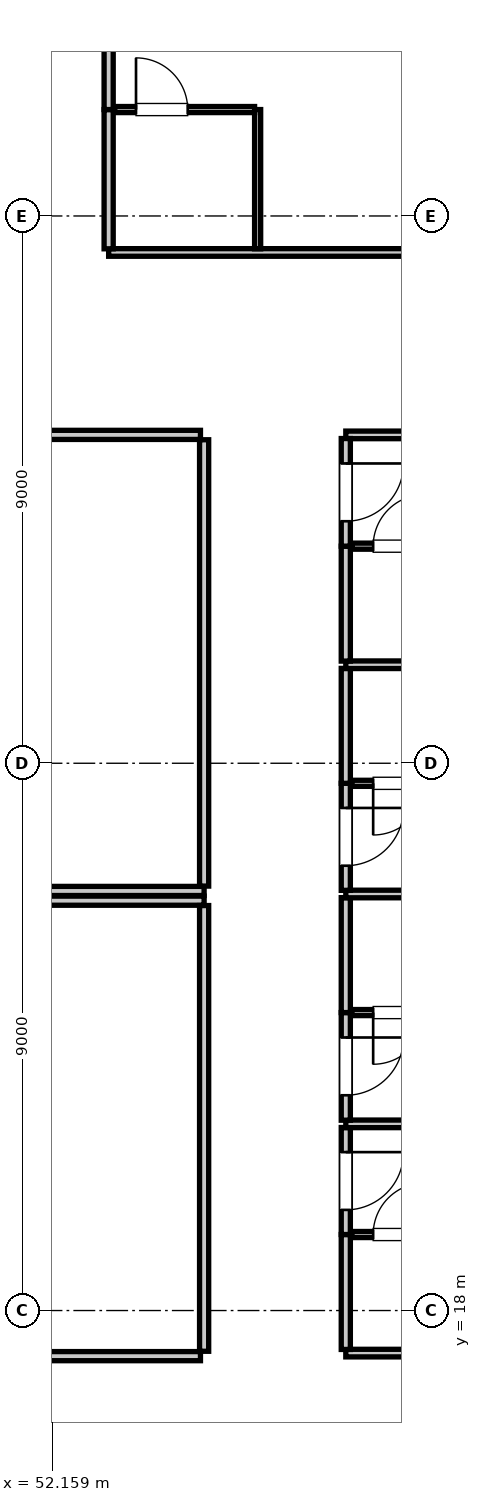
"""IFC4 building model, lengths in metres.
Left out: names, types, materials, properties, quantities, classifications, styles, units other than length and angle.
Written with IfcOpenShell. Run it as: python <this file> out.ifc"""

import sys

from ifc_helpers import new_model, si_unit, direction, frame, frame_2d, origin, place, context, subcontext, project, spatial, rectangle, extrude, element, fill, save


model = new_model("IFC4")
c1 = context("Model", 3, precision=1e-05, world=origin(), true_north=direction((0.0, 1.0)))
c2 = subcontext(c1, "Body", "Model", "MODEL_VIEW")
j1 = project(units=[si_unit("LENGTHUNIT", "METRE"), si_unit("PLANEANGLEUNIT", "RADIAN")], contexts=[c1])
p1 = place(None, origin())
s1 = spatial("IfcSite", under=j1, at=p1, CompositionType="ELEMENT")
p2 = place(p1, origin())
s2 = spatial("IfcBuilding", under=s1, at=p2, CompositionType="ELEMENT")
p3 = place(p2, frame((0.0, 0.0, 100.1)))
s3 = spatial("IfcBuildingStorey", under=s2, at=p3, CompositionType="ELEMENT", Elevation=100.1)
p4 = place(p3, frame((20.95, 24.9, 0.0), z_axis=(0.0, 0.0, 1.0), x_axis=(1.0, 0.0, 0.0)))
e1 = element("IfcWall", 1, at=p4, inside=s3, PredefinedType="PARTITIONING", context=c2, shape_type="SweptSolid", body=[
    extrude(rectangle(XDim=33.7, YDim=0.15, at=frame_2d((16.85, 0.0))), origin(), (0.0, 0.0, 1.0), 3.61),
])
p5 = place(p3, frame((54.65, 24.98, 0.0), z_axis=(0.0, 0.0, 1.0), x_axis=(0.0, 1.0, 0.0)))
e2 = element("IfcWall", 2, at=p5, inside=s3, PredefinedType="PARTITIONING", context=c2, shape_type="SweptSolid", body=[
    extrude(rectangle(XDim=7.34, YDim=0.15, at=frame_2d((3.67, 0.0))), origin(), (0.0, 0.0, 1.0), 3.293),
])
p6 = place(p3, frame((43.222, 32.4, 0.0), z_axis=(0.0, 0.0, 1.0), x_axis=(1.0, 0.0, 0.0)))
e3 = element("IfcWall", 3, at=p6, inside=s3, PredefinedType="PARTITIONING", context=c2, shape_type="SweptSolid", body=[
    extrude(rectangle(XDim=11.368, YDim=0.15, at=frame_2d((5.684, 0.0))), origin(), (0.0, 0.0, 1.0), 3.61),
])
p7 = place(p6, frame((5.234, 0.0, 0.0)))
e4 = element("IfcOpeningElement", 4, at=p7, cuts=e3, PredefinedType="OPENING", context=c2, shape_type="SweptSolid", body=[
    extrude(rectangle(XDim=0.9, YDim=2.1, at=frame_2d((0.45, 1.05))), frame((0.0, 0.085, 0.0), z_axis=(0.0, -1.0, 0.0), x_axis=(1.0, 0.0, 0.0)), (0.0, 0.0, 1.0), 0.17),
])
p8 = place(p3, frame((20.95, 24.74, 0.0), z_axis=(0.0, 0.0, 1.0), x_axis=(1.0, 0.0, 0.0)))
e5 = element("IfcWall", 5, at=p8, inside=s3, PredefinedType="PARTITIONING", context=c2, shape_type="SweptSolid", body=[
    extrude(rectangle(XDim=33.7, YDim=0.15, at=frame_2d((16.85, 0.0))), origin(), (0.0, 0.0, 1.0), 3.61),
])
p9 = place(p3, frame((54.65, 17.33, 0.0), z_axis=(0.0, 0.0, 1.0), x_axis=(0.0, 1.0, 0.0)))
e6 = element("IfcWall", 6, at=p9, inside=s3, PredefinedType="PARTITIONING", context=c2, shape_type="SweptSolid", body=[
    extrude(rectangle(XDim=7.33, YDim=0.15, at=frame_2d((3.665, 0.0))), origin(), (0.0, 0.0, 1.0), 3.255),
])
p10 = place(p3, frame((33.449, 17.25, 0.0), z_axis=(0.0, 0.0, 1.0), x_axis=(1.0, 0.0, 0.0)))
e7 = element("IfcWall", 7, at=p10, inside=s3, PredefinedType="PARTITIONING", context=c2, shape_type="SweptSolid", body=[
    extrude(rectangle(XDim=21.141, YDim=0.15, at=frame_2d((10.571, 0.0))), origin(), (0.0, 0.0, 1.0), 3.61),
])
p11 = place(p10, frame((10.121, 0.0, 0.0)))
e8 = element("IfcOpeningElement", 8, at=p11, cuts=e7, PredefinedType="OPENING", context=c2, shape_type="SweptSolid", body=[
    extrude(rectangle(XDim=0.9, YDim=2.1, at=frame_2d((0.45, 1.05))), frame((0.0, 0.085, 0.0), z_axis=(0.0, -1.0, 0.0), x_axis=(1.0, 0.0, 0.0)), (0.0, 0.0, 1.0), 0.17),
])
for number, where, z_axis, x_axis in (
    (9, (56.98, 17.3, 0.0), (0.0, 0.0, 1.0), (1.0, 0.0, 0.0)),
    (10, (56.98, 32.4, 0.0), (0.0, 0.0, 1.0), (1.0, 0.0, 0.0)),
):
    element("IfcWall", number, at=place(p3, frame(where, z_axis=z_axis, x_axis=x_axis)), inside=s3, PredefinedType="PARTITIONING", context=c2, shape_type="SweptSolid", body=[
        extrude(rectangle(XDim=7.72, YDim=0.125, at=frame_2d((3.86, 0.0))), origin(), (0.0, 0.0, 1.0), 3.61),
    ])
p12 = place(p3, frame((56.98, 17.36, 0.0), z_axis=(0.0, 0.0, 1.0), x_axis=(0.0, 1.0, 0.0)))
e11 = element("IfcWall", 11, at=p12, inside=s3, PredefinedType="PARTITIONING", context=c2, shape_type="SweptSolid", body=[
    extrude(rectangle(XDim=1.89, YDim=0.15, at=frame_2d((0.945, 0.0))), origin(), (0.0, 0.0, 1.0), 3.61),
])
p13 = place(p3, frame((56.98, 19.25, 0.0), z_axis=(0.0, 0.0, 1.0), x_axis=(0.0, 1.0, 0.0)))
e12 = element("IfcWall", 12, at=p13, inside=s3, PredefinedType="PARTITIONING", context=c2, shape_type="SweptSolid", body=[
    extrude(rectangle(XDim=1.76, YDim=0.15, at=frame_2d((0.88, 0.0))), origin(), (0.0, 0.0, 1.0), 3.61),
])
p14 = place(p13, frame((0.405, 0.0, 0.0)))
e13 = element("IfcOpeningElement", 13, at=p14, cuts=e12, PredefinedType="OPENING", context=c2, shape_type="SweptSolid", body=[
    extrude(rectangle(XDim=0.95, YDim=2.15, at=frame_2d((0.475, 1.075))), frame((0.0, 0.085, 0.0), z_axis=(0.0, -1.0, 0.0), x_axis=(1.0, 0.0, 0.0)), (0.0, 0.0, 1.0), 0.17),
])
p15 = place(p3, frame((57.08, 19.25, 0.0), z_axis=(0.0, 0.0, 1.0), x_axis=(1.0, 0.0, 0.0)))
e14 = element("IfcWall", 14, at=p15, inside=s3, PredefinedType="PARTITIONING", context=c2, shape_type="SweptSolid", body=[
    extrude(rectangle(XDim=2.3, YDim=0.1, at=frame_2d((1.15, 0.0))), origin(), (0.0, 0.0, 1.0), 3.61),
])
p16 = place(p15, frame((0.35, 0.0, 0.0)))
e15 = element("IfcOpeningElement", 15, at=p16, cuts=e14, PredefinedType="OPENING", context=c2, shape_type="SweptSolid", body=[
    extrude(rectangle(XDim=0.85, YDim=2.1, at=frame_2d((0.425, 1.05))), frame((0.0, 0.06, 0.0), z_axis=(0.0, -1.0, 0.0), x_axis=(1.0, 0.0, 0.0)), (0.0, 0.0, 1.0), 0.12),
])
p17 = place(p3, frame((56.98, 21.07, 0.0), z_axis=(0.0, 0.0, 1.0), x_axis=(1.0, 0.0, 0.0)))
e16 = element("IfcWall", 16, at=p17, inside=s3, PredefinedType="PARTITIONING", context=c2, shape_type="SweptSolid", body=[
    extrude(rectangle(XDim=7.72, YDim=0.125, at=frame_2d((3.86, 0.0))), origin(), (0.0, 0.0, 1.0), 3.61),
])
p18 = place(p3, frame((56.98, 21.13, 0.0), z_axis=(0.0, 0.0, 1.0), x_axis=(0.0, 1.0, 0.0)))
e17 = element("IfcWall", 17, at=p18, inside=s3, PredefinedType="PARTITIONING", context=c2, shape_type="SweptSolid", body=[
    extrude(rectangle(XDim=1.77, YDim=0.15, at=frame_2d((0.885, 0.0))), origin(), (0.0, 0.0, 1.0), 3.61),
])
p19 = place(p18, frame((0.41, 0.0, 0.0)))
e18 = element("IfcOpeningElement", 18, at=p19, cuts=e17, PredefinedType="OPENING", context=c2, shape_type="SweptSolid", body=[
    extrude(rectangle(XDim=0.95, YDim=2.15, at=frame_2d((0.475, 1.075))), frame((0.0, 0.085, 0.0), z_axis=(0.0, -1.0, 0.0), x_axis=(1.0, 0.0, 0.0)), (0.0, 0.0, 1.0), 0.17),
])
p20 = place(p3, frame((56.98, 22.9, 0.0), z_axis=(0.0, 0.0, 1.0), x_axis=(0.0, 1.0, 0.0)))
e19 = element("IfcWall", 19, at=p20, inside=s3, PredefinedType="PARTITIONING", context=c2, shape_type="SweptSolid", body=[
    extrude(rectangle(XDim=1.89, YDim=0.15, at=frame_2d((0.945, 0.0))), origin(), (0.0, 0.0, 1.0), 3.61),
])
p21 = place(p3, frame((57.08, 22.9, 0.0), z_axis=(0.0, 0.0, 1.0), x_axis=(1.0, 0.0, 0.0)))
e20 = element("IfcWall", 20, at=p21, inside=s3, PredefinedType="PARTITIONING", context=c2, shape_type="SweptSolid", body=[
    extrude(rectangle(XDim=2.3, YDim=0.1, at=frame_2d((1.15, 0.0))), origin(), (0.0, 0.0, 1.0), 3.61),
])
p22 = place(p21, frame((0.35, 0.0, 0.0)))
e21 = element("IfcOpeningElement", 21, at=p22, cuts=e20, PredefinedType="OPENING", context=c2, shape_type="SweptSolid", body=[
    extrude(rectangle(XDim=0.85, YDim=2.1, at=frame_2d((0.425, 1.05))), frame((0.0, 0.06, 0.0), z_axis=(0.0, -1.0, 0.0), x_axis=(1.0, 0.0, 0.0)), (0.0, 0.0, 1.0), 0.12),
])
p23 = place(p3, frame((56.98, 24.85, 0.0), z_axis=(0.0, 0.0, 1.0), x_axis=(1.0, 0.0, 0.0)))
e22 = element("IfcWall", 22, at=p23, inside=s3, PredefinedType="PARTITIONING", context=c2, shape_type="SweptSolid", body=[
    extrude(rectangle(XDim=7.72, YDim=0.125, at=frame_2d((3.86, 0.0))), origin(), (0.0, 0.0, 1.0), 3.61),
])
p24 = place(p3, frame((56.98, 24.91, 0.0), z_axis=(0.0, 0.0, 1.0), x_axis=(0.0, 1.0, 0.0)))
e23 = element("IfcWall", 23, at=p24, inside=s3, PredefinedType="PARTITIONING", context=c2, shape_type="SweptSolid", body=[
    extrude(rectangle(XDim=1.76, YDim=0.15, at=frame_2d((0.88, 0.0))), origin(), (0.0, 0.0, 1.0), 3.61),
])
p25 = place(p24, frame((0.405, 0.0, 0.0)))
e24 = element("IfcOpeningElement", 24, at=p25, cuts=e23, PredefinedType="OPENING", context=c2, shape_type="SweptSolid", body=[
    extrude(rectangle(XDim=0.95, YDim=2.15, at=frame_2d((0.475, 1.075))), frame((0.0, 0.085, 0.0), z_axis=(0.0, -1.0, 0.0), x_axis=(1.0, 0.0, 0.0)), (0.0, 0.0, 1.0), 0.17),
])
p26 = place(p3, frame((56.98, 26.67, 0.0), z_axis=(0.0, 0.0, 1.0), x_axis=(0.0, 1.0, 0.0)))
e25 = element("IfcWall", 25, at=p26, inside=s3, PredefinedType="PARTITIONING", context=c2, shape_type="SweptSolid", body=[
    extrude(rectangle(XDim=1.89, YDim=0.15, at=frame_2d((0.945, 0.0))), origin(), (0.0, 0.0, 1.0), 3.61),
])
p27 = place(p3, frame((57.08, 26.67, 0.0), z_axis=(0.0, 0.0, 1.0), x_axis=(1.0, 0.0, 0.0)))
e26 = element("IfcWall", 26, at=p27, inside=s3, PredefinedType="PARTITIONING", context=c2, shape_type="SweptSolid", body=[
    extrude(rectangle(XDim=2.3, YDim=0.1, at=frame_2d((1.15, 0.0))), origin(), (0.0, 0.0, 1.0), 3.61),
])
p28 = place(p27, frame((0.35, 0.0, 0.0)))
e27 = element("IfcOpeningElement", 27, at=p28, cuts=e26, PredefinedType="OPENING", context=c2, shape_type="SweptSolid", body=[
    extrude(rectangle(XDim=0.85, YDim=2.1, at=frame_2d((0.425, 1.05))), frame((0.0, 0.06, 0.0), z_axis=(0.0, -1.0, 0.0), x_axis=(1.0, 0.0, 0.0)), (0.0, 0.0, 1.0), 0.12),
])
p29 = place(p3, frame((56.98, 28.62, 0.0), z_axis=(0.0, 0.0, 1.0), x_axis=(1.0, 0.0, 0.0)))
e28 = element("IfcWall", 28, at=p29, inside=s3, PredefinedType="PARTITIONING", context=c2, shape_type="SweptSolid", body=[
    extrude(rectangle(XDim=7.72, YDim=0.125, at=frame_2d((3.86, 0.0))), origin(), (0.0, 0.0, 1.0), 3.61),
])
p30 = place(p3, frame((56.98, 28.68, 0.0), z_axis=(0.0, 0.0, 1.0), x_axis=(0.0, 1.0, 0.0)))
e29 = element("IfcWall", 29, at=p30, inside=s3, PredefinedType="PARTITIONING", context=c2, shape_type="SweptSolid", body=[
    extrude(rectangle(XDim=1.89, YDim=0.15, at=frame_2d((0.945, 0.0))), origin(), (0.0, 0.0, 1.0), 3.61),
])
p31 = place(p3, frame((56.98, 30.57, 0.0), z_axis=(0.0, 0.0, 1.0), x_axis=(0.0, 1.0, 0.0)))
e30 = element("IfcWall", 30, at=p31, inside=s3, PredefinedType="PARTITIONING", context=c2, shape_type="SweptSolid", body=[
    extrude(rectangle(XDim=1.77, YDim=0.15, at=frame_2d((0.885, 0.0))), origin(), (0.0, 0.0, 1.0), 3.61),
])
p32 = place(p31, frame((0.41, 0.0, 0.0)))
e31 = element("IfcOpeningElement", 31, at=p32, cuts=e30, PredefinedType="OPENING", context=c2, shape_type="SweptSolid", body=[
    extrude(rectangle(XDim=0.95, YDim=2.15, at=frame_2d((0.475, 1.075))), frame((0.0, 0.085, 0.0), z_axis=(0.0, -1.0, 0.0), x_axis=(1.0, 0.0, 0.0)), (0.0, 0.0, 1.0), 0.17),
])
p33 = place(p3, frame((57.08, 30.57, 0.0), z_axis=(0.0, 0.0, 1.0), x_axis=(1.0, 0.0, 0.0)))
e32 = element("IfcWall", 32, at=p33, inside=s3, PredefinedType="PARTITIONING", context=c2, shape_type="SweptSolid", body=[
    extrude(rectangle(XDim=2.3, YDim=0.1, at=frame_2d((1.15, 0.0))), origin(), (0.0, 0.0, 1.0), 3.61),
])
p34 = place(p33, frame((0.35, 0.0, 0.0)))
e33 = element("IfcOpeningElement", 33, at=p34, cuts=e32, PredefinedType="OPENING", context=c2, shape_type="SweptSolid", body=[
    extrude(rectangle(XDim=0.85, YDim=2.1, at=frame_2d((0.425, 1.05))), frame((0.0, 0.06, 0.0), z_axis=(0.0, -1.0, 0.0), x_axis=(1.0, 0.0, 0.0)), (0.0, 0.0, 1.0), 0.12),
])
p35 = place(p3, frame((53.08, 35.4, 0.0), z_axis=(0.0, 0.0, 1.0), x_axis=(1.0, 0.0, 0.0)))
e34 = element("IfcWall", 34, at=p35, inside=s3, PredefinedType="PARTITIONING", context=c2, shape_type="SweptSolid", body=[
    extrude(rectangle(XDim=11.62, YDim=0.125, at=frame_2d((5.81, 0.0))), origin(), (0.0, 0.0, 1.0), 3.61),
])
p36 = place(p3, frame((53.08, 35.46, 0.0), z_axis=(0.0, 0.0, 1.0), x_axis=(0.0, 1.0, 0.0)))
e35 = element("IfcWall", 35, at=p36, inside=s3, PredefinedType="PARTITIONING", context=c2, shape_type="SweptSolid", body=[
    extrude(rectangle(XDim=2.29, YDim=0.15, at=frame_2d((1.145, 0.0))), origin(), (0.0, 0.0, 1.0), 3.61),
])
p37 = place(p3, frame((53.08, 37.75, 0.0), z_axis=(0.0, 0.0, 1.0), x_axis=(0.0, 1.0, 0.0)))
e36 = element("IfcWall", 36, at=p37, inside=s3, PredefinedType="PARTITIONING", context=c2, shape_type="SweptSolid", body=[
    extrude(rectangle(XDim=5.059, YDim=0.15, at=frame_2d((2.529, 0.0))), origin(), (0.0, 0.0, 1.0), 3.61),
])
p38 = place(p37, frame((2.054, 0.0, 0.0)))
e37 = element("IfcOpeningElement", 37, at=p38, cuts=e36, PredefinedType="OPENING", context=c2, shape_type="SweptSolid", body=[
    extrude(rectangle(XDim=0.95, YDim=2.15, at=frame_2d((0.475, 1.075))), frame((0.0, 0.085, 0.0), z_axis=(0.0, -1.0, 0.0), x_axis=(1.0, 0.0, 0.0)), (0.0, 0.0, 1.0), 0.17),
])
p39 = place(p3, frame((55.53, 35.46, 0.0), z_axis=(0.0, 0.0, 1.0), x_axis=(0.0, 1.0, 0.0)))
e38 = element("IfcWall", 38, at=p39, inside=s3, PredefinedType="PARTITIONING", context=c2, shape_type="SweptSolid", body=[
    extrude(rectangle(XDim=2.29, YDim=0.1, at=frame_2d((1.145, 0.0))), origin(), (0.0, 0.0, 1.0), 3.61),
])
p40 = place(p3, frame((53.18, 37.75, 0.0), z_axis=(0.0, 0.0, 1.0), x_axis=(1.0, 0.0, 0.0)))
e39 = element("IfcWall", 39, at=p40, inside=s3, PredefinedType="PARTITIONING", context=c2, shape_type="SweptSolid", body=[
    extrude(rectangle(XDim=2.3, YDim=0.1, at=frame_2d((1.15, 0.0))), origin(), (0.0, 0.0, 1.0), 3.61),
])
p41 = place(p40, frame((0.35, 0.0, 0.0)))
e40 = element("IfcOpeningElement", 40, at=p41, cuts=e39, PredefinedType="OPENING", context=c2, shape_type="SweptSolid", body=[
    extrude(rectangle(XDim=0.85, YDim=2.1, at=frame_2d((0.425, 1.05))), frame((0.0, 0.06, 0.0), z_axis=(0.0, -1.0, 0.0), x_axis=(1.0, 0.0, 0.0)), (0.0, 0.0, 1.0), 0.12),
])
p42 = place(p16, origin())
e41 = element("IfcDoor", 41, at=p42, inside=s3, OperationType="SINGLE_SWING_RIGHT", PredefinedType="DOOR", context=c2, shape_type="SweptSolid", body=[
    extrude(rectangle(XDim=0.85, YDim=2.1, at=frame_2d((0.425, 1.05))), frame((0.0, 0.025, 0.0), z_axis=(0.0, -1.0, 0.0), x_axis=(1.0, 0.0, 0.0)), (0.0, 0.0, 1.0), 0.05),
])
fill(e15, e41)
p43 = place(p14, frame((0.95, 0.0, 0.0), z_axis=(0.0, 0.0, 1.0), x_axis=(-1.0, 0.0, 0.0)))
e42 = element("IfcDoor", 42, at=p43, inside=s3, OperationType="SINGLE_SWING_LEFT", PredefinedType="DOOR", context=c2, shape_type="SweptSolid", body=[
    extrude(rectangle(XDim=0.95, YDim=2.15, at=frame_2d((0.475, 1.075))), frame((0.0, 0.025, 0.0), z_axis=(0.0, -1.0, 0.0), x_axis=(1.0, 0.0, 0.0)), (0.0, 0.0, 1.0), 0.05),
])
fill(e13, e42)
p44 = place(p22, frame((0.85, 0.0, 0.0), z_axis=(0.0, 0.0, 1.0), x_axis=(-1.0, 0.0, 0.0)))
e43 = element("IfcDoor", 43, at=p44, inside=s3, OperationType="SINGLE_SWING_RIGHT", PredefinedType="DOOR", context=c2, shape_type="SweptSolid", body=[
    extrude(rectangle(XDim=0.85, YDim=2.1, at=frame_2d((0.425, 1.05))), frame((0.0, 0.025, 0.0), z_axis=(0.0, -1.0, 0.0), x_axis=(1.0, 0.0, 0.0)), (0.0, 0.0, 1.0), 0.05),
])
fill(e21, e43)
p45 = place(p19, frame((0.95, 0.0, 0.0), z_axis=(0.0, 0.0, 1.0), x_axis=(-1.0, 0.0, 0.0)))
e44 = element("IfcDoor", 44, at=p45, inside=s3, OperationType="SINGLE_SWING_LEFT", PredefinedType="DOOR", context=c2, shape_type="SweptSolid", body=[
    extrude(rectangle(XDim=0.95, YDim=2.15, at=frame_2d((0.475, 1.075))), frame((0.0, 0.025, 0.0), z_axis=(0.0, -1.0, 0.0), x_axis=(1.0, 0.0, 0.0)), (0.0, 0.0, 1.0), 0.05),
])
fill(e18, e44)
p46 = place(p28, frame((0.85, 0.0, 0.0), z_axis=(0.0, 0.0, 1.0), x_axis=(-1.0, 0.0, 0.0)))
e45 = element("IfcDoor", 45, at=p46, inside=s3, OperationType="SINGLE_SWING_RIGHT", PredefinedType="DOOR", context=c2, shape_type="SweptSolid", body=[
    extrude(rectangle(XDim=0.85, YDim=2.1, at=frame_2d((0.425, 1.05))), frame((0.0, 0.025, 0.0), z_axis=(0.0, -1.0, 0.0), x_axis=(1.0, 0.0, 0.0)), (0.0, 0.0, 1.0), 0.05),
])
fill(e27, e45)
p47 = place(p25, frame((0.95, 0.0, 0.0), z_axis=(0.0, 0.0, 1.0), x_axis=(-1.0, 0.0, 0.0)))
e46 = element("IfcDoor", 46, at=p47, inside=s3, OperationType="SINGLE_SWING_LEFT", PredefinedType="DOOR", context=c2, shape_type="SweptSolid", body=[
    extrude(rectangle(XDim=0.95, YDim=2.15, at=frame_2d((0.475, 1.075))), frame((0.0, 0.025, 0.0), z_axis=(0.0, -1.0, 0.0), x_axis=(1.0, 0.0, 0.0)), (0.0, 0.0, 1.0), 0.05),
])
fill(e24, e46)
p48 = place(p34, origin())
e47 = element("IfcDoor", 47, at=p48, inside=s3, OperationType="SINGLE_SWING_RIGHT", PredefinedType="DOOR", context=c2, shape_type="SweptSolid", body=[
    extrude(rectangle(XDim=0.85, YDim=2.1, at=frame_2d((0.425, 1.05))), frame((0.0, 0.025, 0.0), z_axis=(0.0, -1.0, 0.0), x_axis=(1.0, 0.0, 0.0)), (0.0, 0.0, 1.0), 0.05),
])
fill(e33, e47)
p49 = place(p32, frame((0.95, 0.0, 0.0), z_axis=(0.0, 0.0, 1.0), x_axis=(-1.0, 0.0, 0.0)))
e48 = element("IfcDoor", 48, at=p49, inside=s3, OperationType="SINGLE_SWING_LEFT", PredefinedType="DOOR", context=c2, shape_type="SweptSolid", body=[
    extrude(rectangle(XDim=0.95, YDim=2.15, at=frame_2d((0.475, 1.075))), frame((0.0, 0.025, 0.0), z_axis=(0.0, -1.0, 0.0), x_axis=(1.0, 0.0, 0.0)), (0.0, 0.0, 1.0), 0.05),
])
fill(e31, e48)
p50 = place(p41, origin())
e49 = element("IfcDoor", 49, at=p50, inside=s3, OperationType="SINGLE_SWING_LEFT", PredefinedType="DOOR", context=c2, shape_type="SweptSolid", body=[
    extrude(rectangle(XDim=0.85, YDim=2.1, at=frame_2d((0.425, 1.05))), frame((0.0, 0.025, 0.0), z_axis=(0.0, -1.0, 0.0), x_axis=(1.0, 0.0, 0.0)), (0.0, 0.0, 1.0), 0.05),
])
fill(e40, e49)
save(model, sys.argv[1])
